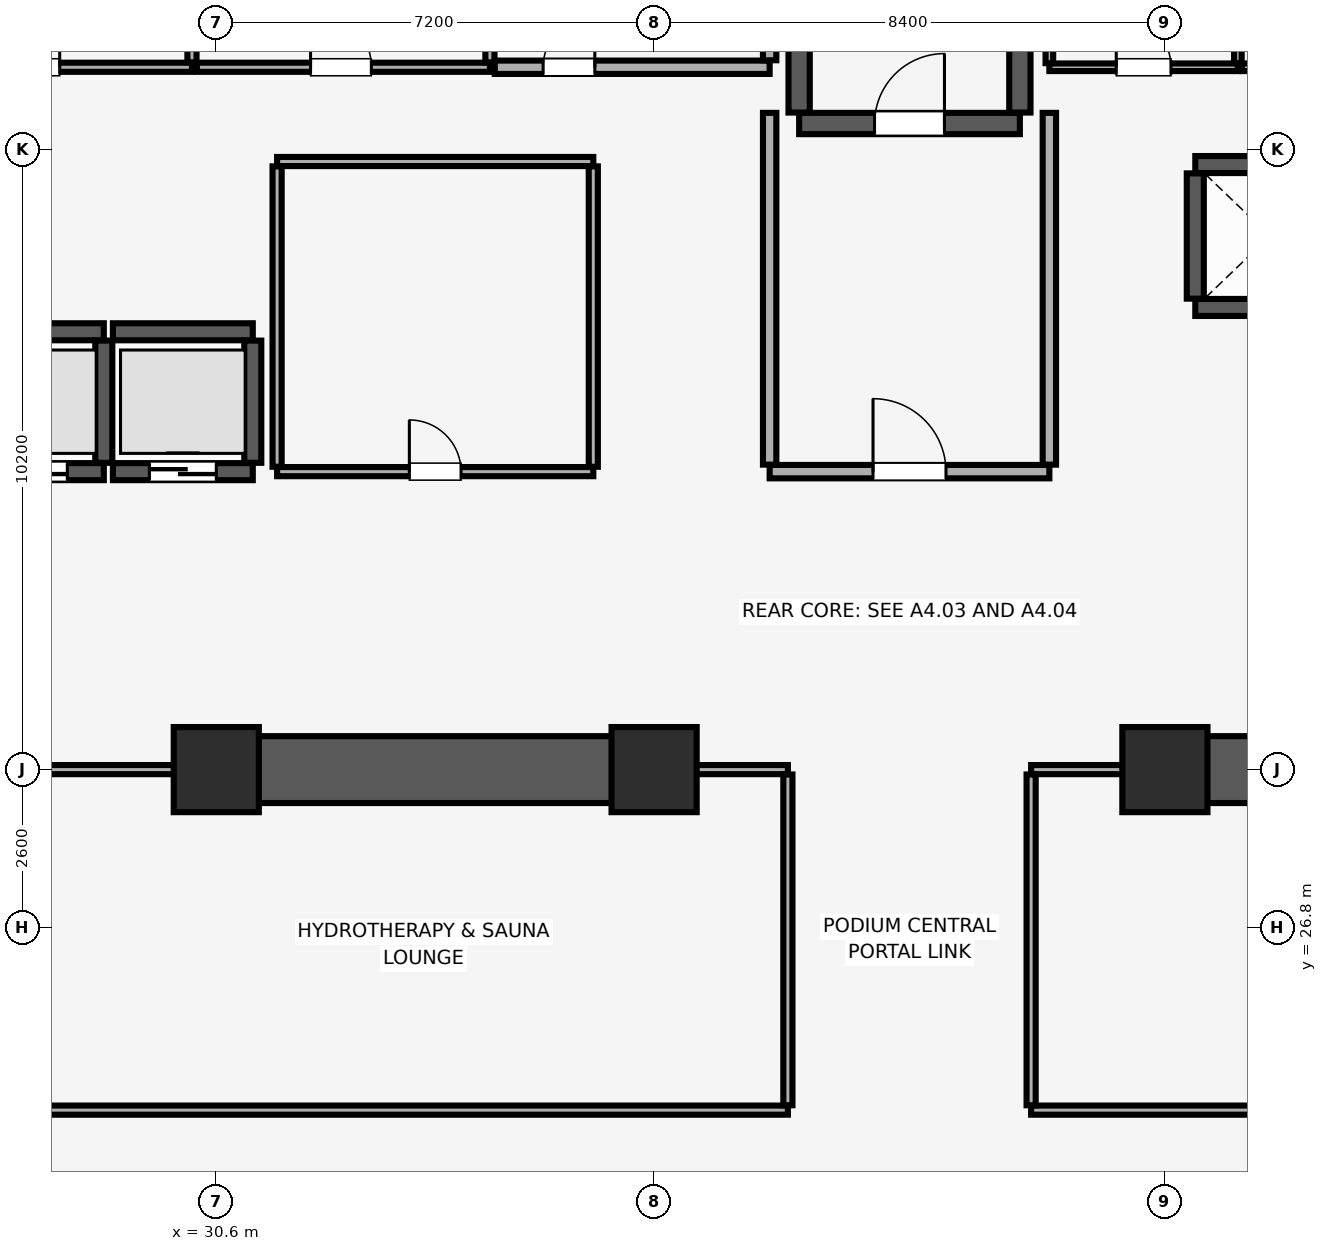
"""IFC4 building model, lengths in metres.
Left out: names, types, materials, properties, quantities, classifications, styles, units other than length and angle.
Written with IfcOpenShell. Run it as: python <this file> out.ifc"""

import sys

from ifc_helpers import new_model, si_unit, direction, frame, frame_2d, origin, origin_2d, place, context, subcontext, project, spatial, rectangle, extrude, element, fill, save


model = new_model("IFC4")
c1 = context("Model", 3, precision=1e-05, world=origin(), true_north=direction((0.0, 1.0)))
c2 = subcontext(c1, "Body", "Model", "MODEL_VIEW")
j1 = project(units=[si_unit("LENGTHUNIT", "METRE"), si_unit("PLANEANGLEUNIT", "RADIAN")], contexts=[c1])
p1 = place(None, origin())
s1 = spatial("IfcSite", under=j1, at=p1, CompositionType="ELEMENT")
p2 = place(p1, origin())
s2 = spatial("IfcBuilding", under=s1, at=p2, CompositionType="ELEMENT")
p3 = place(p2, frame((0.0, 0.0, 26.0)))
s3 = spatial("IfcBuildingStorey", under=s2, at=p3, CompositionType="ELEMENT", Elevation=26.0)
for number, where, z_axis, x_axis in (
    (1, (30.6, 29.4, 0.0), (0.0, 0.0, 1.0), (1.0, 0.0, 0.0)),
    (2, (37.8, 29.4, 0.0), (0.0, 0.0, 1.0), (1.0, 0.0, 0.0)),
    (3, (46.2, 29.4, 0.0), (0.0, 0.0, 1.0), (1.0, 0.0, 0.0)),
):
    element("IfcColumn", number, at=place(p3, frame(where, z_axis=z_axis, x_axis=x_axis)), inside=s3, PredefinedType="COLUMN", context=c2, shape_type="SweptSolid", body=[
        extrude(rectangle(XDim=1.4, YDim=1.4, at=origin_2d()), origin(), (0.0, 0.0, 1.0), 5.16),
    ])
for number, where, z_axis, x_axis in (
    (4, (30.4, 29.4, 0.0), (0.0, 0.0, 1.0), (1.0, 0.0, 0.0)),
    (5, (46.0, 29.4, 0.0), (0.0, 0.0, 1.0), (1.0, 0.0, 0.0)),
):
    element("IfcWall", number, at=place(p3, frame(where, z_axis=z_axis, x_axis=x_axis)), inside=s3, PredefinedType="SHEAR", context=c2, shape_type="SweptSolid", body=[
        extrude(rectangle(XDim=7.6, YDim=1.1, at=frame_2d((3.8, 0.0))), origin(), (0.0, 0.0, 1.0), 5.12),
    ])
p4 = place(p3, frame((40.185, 40.025, 0.0), z_axis=(0.0, 0.0, 1.0), x_axis=(1.0, 0.0, 0.0)))
e6 = element("IfcWall", 6, at=p4, inside=s3, PredefinedType="SHEAR", context=c2, shape_type="SweptSolid", body=[
    extrude(rectangle(XDim=3.63, YDim=0.35, at=frame_2d((1.815, 0.0))), origin(), (0.0, 0.0, 1.0), 5.12),
])
p5 = place(p4, frame((1.24, 0.0, 0.0)))
e7 = element("IfcOpeningElement", 7, at=p5, cuts=e6, PredefinedType="OPENING", context=c2, shape_type="SweptSolid", body=[
    extrude(rectangle(XDim=1.15, YDim=2.15, at=frame_2d((0.575, 1.075))), frame((0.0, 0.185, 0.0), z_axis=(0.0, -1.0, 0.0), x_axis=(1.0, 0.0, 0.0)), (0.0, 0.0, 1.0), 0.37),
])
for number, where, z_axis, x_axis in (
    (8, (40.185, 40.205, 0.0), (0.0, 0.0, 1.0), (0.0, 1.0, 0.0)),
    (9, (43.815, 40.205, 0.0), (0.0, 0.0, 1.0), (0.0, 1.0, 0.0)),
):
    element("IfcWall", number, at=place(p3, frame(where, z_axis=z_axis, x_axis=x_axis)), inside=s3, PredefinedType="SHEAR", context=c2, shape_type="SweptSolid", body=[
        extrude(rectangle(XDim=8.09, YDim=0.35, at=frame_2d((4.045, 0.0))), origin(), (0.0, 0.0, 1.0), 5.12),
    ])
p6 = place(p3, frame((26.45, 34.3, 0.0), z_axis=(0.0, 0.0, 1.0), x_axis=(1.0, 0.0, 0.0)))
e10 = element("IfcWall", 10, at=p6, inside=s3, PredefinedType="SHEAR", context=c2, shape_type="SweptSolid", body=[
    extrude(rectangle(XDim=2.3, YDim=0.28, at=frame_2d((1.15, 0.0))), origin(), (0.0, 0.0, 1.0), 5.12),
])
p7 = place(p6, frame((0.6, 0.0, 0.0)))
e11 = element("IfcOpeningElement", 11, at=p7, cuts=e10, PredefinedType="OPENING", context=c2, shape_type="SweptSolid", body=[
    extrude(rectangle(XDim=1.1, YDim=2.2, at=frame_2d((0.55, 1.1))), frame((0.0, 0.15, 0.0), z_axis=(0.0, -1.0, 0.0), x_axis=(1.0, 0.0, 0.0)), (0.0, 0.0, 1.0), 0.3),
])
p8 = place(p3, frame((26.45, 36.6, 0.0), z_axis=(0.0, 0.0, 1.0), x_axis=(1.0, 0.0, 0.0)))
e12 = element("IfcWall", 12, at=p8, inside=s3, PredefinedType="SHEAR", context=c2, shape_type="SweptSolid", body=[
    extrude(rectangle(XDim=2.3, YDim=0.28, at=frame_2d((1.15, 0.0))), origin(), (0.0, 0.0, 1.0), 5.12),
])
p9 = place(p3, frame((28.75, 34.445, 0.0), z_axis=(0.0, 0.0, 1.0), x_axis=(0.0, 1.0, 0.0)))
e13 = element("IfcWall", 13, at=p9, inside=s3, PredefinedType="SHEAR", context=c2, shape_type="SweptSolid", body=[
    extrude(rectangle(XDim=2.01, YDim=0.28, at=frame_2d((1.005, 0.0))), origin(), (0.0, 0.0, 1.0), 5.12),
])
p10 = place(p3, frame((28.9, 34.3, 0.0), z_axis=(0.0, 0.0, 1.0), x_axis=(1.0, 0.0, 0.0)))
e14 = element("IfcWall", 14, at=p10, inside=s3, PredefinedType="SHEAR", context=c2, shape_type="SweptSolid", body=[
    extrude(rectangle(XDim=2.3, YDim=0.28, at=frame_2d((1.15, 0.0))), origin(), (0.0, 0.0, 1.0), 5.12),
])
p11 = place(p10, frame((0.6, 0.0, 0.0)))
e15 = element("IfcOpeningElement", 15, at=p11, cuts=e14, PredefinedType="OPENING", context=c2, shape_type="SweptSolid", body=[
    extrude(rectangle(XDim=1.1, YDim=2.2, at=frame_2d((0.55, 1.1))), frame((0.0, 0.15, 0.0), z_axis=(0.0, -1.0, 0.0), x_axis=(1.0, 0.0, 0.0)), (0.0, 0.0, 1.0), 0.3),
])
p12 = place(p3, frame((28.9, 36.6, 0.0), z_axis=(0.0, 0.0, 1.0), x_axis=(1.0, 0.0, 0.0)))
e16 = element("IfcWall", 16, at=p12, inside=s3, PredefinedType="SHEAR", context=c2, shape_type="SweptSolid", body=[
    extrude(rectangle(XDim=2.3, YDim=0.28, at=frame_2d((1.15, 0.0))), origin(), (0.0, 0.0, 1.0), 5.12),
])
p13 = place(p3, frame((31.2, 34.445, 0.0), z_axis=(0.0, 0.0, 1.0), x_axis=(0.0, 1.0, 0.0)))
e17 = element("IfcWall", 17, at=p13, inside=s3, PredefinedType="SHEAR", context=c2, shape_type="SweptSolid", body=[
    extrude(rectangle(XDim=2.01, YDim=0.28, at=frame_2d((1.005, 0.0))), origin(), (0.0, 0.0, 1.0), 5.12),
])
for number, where, z_axis, x_axis in (
    (18, (46.7, 37.0, 0.0), (0.0, 0.0, 1.0), (1.0, 0.0, 0.0)),
    (19, (46.7, 39.35, 0.0), (0.0, 0.0, 1.0), (1.0, 0.0, 0.0)),
):
    element("IfcWall", number, at=place(p3, frame(where, z_axis=z_axis, x_axis=x_axis)), inside=s3, PredefinedType="SHEAR", context=c2, shape_type="SweptSolid", body=[
        extrude(rectangle(XDim=2.45, YDim=0.28, at=frame_2d((1.225, 0.0))), origin(), (0.0, 0.0, 1.0), 5.12),
    ])
p14 = place(p3, frame((46.7, 37.145, 0.0), z_axis=(0.0, 0.0, 1.0), x_axis=(0.0, 1.0, 0.0)))
e20 = element("IfcWall", 20, at=p14, inside=s3, PredefinedType="SHEAR", context=c2, shape_type="SweptSolid", body=[
    extrude(rectangle(XDim=2.06, YDim=0.28, at=frame_2d((1.03, 0.0))), origin(), (0.0, 0.0, 1.0), 5.12),
])
p15 = place(p3, frame((39.7, 34.3, 0.0), z_axis=(0.0, 0.0, 1.0), x_axis=(1.0, 0.0, 0.0)))
e21 = element("IfcWall", 21, at=p15, inside=s3, PredefinedType="PARTITIONING", context=c2, shape_type="SweptSolid", body=[
    extrude(rectangle(XDim=4.6, YDim=0.22, at=frame_2d((2.3, 0.0))), origin(), (0.0, 0.0, 1.0), 5.12),
])
p16 = place(p15, frame((1.7, 0.0, 0.0)))
e22 = element("IfcOpeningElement", 22, at=p16, cuts=e21, PredefinedType="OPENING", context=c2, shape_type="SweptSolid", body=[
    extrude(rectangle(XDim=1.2, YDim=2.15, at=frame_2d((0.6, 1.075))), frame((0.0, 0.12, 0.0), z_axis=(0.0, -1.0, 0.0), x_axis=(1.0, 0.0, 0.0)), (0.0, 0.0, 1.0), 0.24),
])
for number, where, z_axis, x_axis in (
    (23, (39.7, 34.415, 0.0), (0.0, 0.0, 1.0), (0.0, 1.0, 0.0)),
    (24, (44.3, 34.415, 0.0), (0.0, 0.0, 1.0), (0.0, 1.0, 0.0)),
):
    element("IfcWall", number, at=place(p3, frame(where, z_axis=z_axis, x_axis=x_axis)), inside=s3, PredefinedType="PARTITIONING", context=c2, shape_type="SweptSolid", body=[
        extrude(rectangle(XDim=5.785, YDim=0.22, at=frame_2d((2.893, 0.0))), origin(), (0.0, 0.0, 1.0), 5.12),
    ])
p17 = place(p3, frame((31.6, 34.3, 0.0), z_axis=(0.0, 0.0, 1.0), x_axis=(1.0, 0.0, 0.0)))
e25 = element("IfcWall", 25, at=p17, inside=s3, PredefinedType="PARTITIONING", context=c2, shape_type="SweptSolid", body=[
    extrude(rectangle(XDim=5.2, YDim=0.15, at=frame_2d((2.6, 0.0))), origin(), (0.0, 0.0, 1.0), 5.12),
])
p18 = place(p17, frame((2.175, 0.0, 0.0)))
e26 = element("IfcOpeningElement", 26, at=p18, cuts=e25, PredefinedType="OPENING", context=c2, shape_type="SweptSolid", body=[
    extrude(rectangle(XDim=0.85, YDim=2.1, at=frame_2d((0.425, 1.05))), frame((0.0, 0.085, 0.0), z_axis=(0.0, -1.0, 0.0), x_axis=(1.0, 0.0, 0.0)), (0.0, 0.0, 1.0), 0.17),
])
p19 = place(p3, frame((31.6, 39.4, 0.0), z_axis=(0.0, 0.0, 1.0), x_axis=(1.0, 0.0, 0.0)))
e27 = element("IfcWall", 27, at=p19, inside=s3, PredefinedType="PARTITIONING", context=c2, shape_type="SweptSolid", body=[
    extrude(rectangle(XDim=5.2, YDim=0.15, at=frame_2d((2.6, 0.0))), origin(), (0.0, 0.0, 1.0), 5.12),
])
for number, where, z_axis, x_axis in (
    (28, (31.6, 34.38, 0.0), (0.0, 0.0, 1.0), (0.0, 1.0, 0.0)),
    (29, (36.8, 34.38, 0.0), (0.0, 0.0, 1.0), (0.0, 1.0, 0.0)),
):
    element("IfcWall", number, at=place(p3, frame(where, z_axis=z_axis, x_axis=x_axis)), inside=s3, PredefinedType="PARTITIONING", context=c2, shape_type="SweptSolid", body=[
        extrude(rectangle(XDim=4.94, YDim=0.15, at=frame_2d((2.47, 0.0))), origin(), (0.0, 0.0, 1.0), 5.12),
    ])
p20 = place(p3, frame((25.0, 40.95, 0.0), z_axis=(0.0, 0.0, 1.0), x_axis=(1.0, 0.0, 0.0)))
e30 = element("IfcWall", 30, at=p20, inside=s3, PredefinedType="PARTITIONING", context=c2, shape_type="SweptSolid", body=[
    extrude(rectangle(XDim=5.2, YDim=0.15, at=frame_2d((2.6, 0.0))), origin(), (0.0, 0.0, 1.0), 5.12),
])
p21 = place(p20, frame((2.175, 0.0, 0.0)))
e31 = element("IfcOpeningElement", 31, at=p21, cuts=e30, PredefinedType="OPENING", context=c2, shape_type="SweptSolid", body=[
    extrude(rectangle(XDim=0.85, YDim=2.1, at=frame_2d((0.425, 1.05))), frame((0.0, 0.085, 0.0), z_axis=(0.0, -1.0, 0.0), x_axis=(1.0, 0.0, 0.0)), (0.0, 0.0, 1.0), 0.17),
])
p22 = place(p3, frame((30.2, 41.03, 0.0), z_axis=(0.0, 0.0, 1.0), x_axis=(0.0, 1.0, 0.0)))
e32 = element("IfcWall", 32, at=p22, inside=s3, PredefinedType="PARTITIONING", context=c2, shape_type="SweptSolid", body=[
    extrude(rectangle(XDim=7.19, YDim=0.15, at=frame_2d((3.595, 0.0))), origin(), (0.0, 0.0, 1.0), 5.12),
])
p23 = place(p3, frame((30.28, 40.95, 0.0), z_axis=(0.0, 0.0, 1.0), x_axis=(1.0, 0.0, 0.0)))
e33 = element("IfcWall", 33, at=p23, inside=s3, PredefinedType="PARTITIONING", context=c2, shape_type="SweptSolid", body=[
    extrude(rectangle(XDim=4.82, YDim=0.15, at=frame_2d((2.41, 0.0))), origin(), (0.0, 0.0, 1.0), 5.12),
])
p24 = place(p23, frame((1.87, 0.0, 0.0)))
e34 = element("IfcOpeningElement", 34, at=p24, cuts=e33, PredefinedType="OPENING", context=c2, shape_type="SweptSolid", body=[
    extrude(rectangle(XDim=1.0, YDim=2.15, at=frame_2d((0.5, 1.075))), frame((0.0, 0.085, 0.0), z_axis=(0.0, -1.0, 0.0), x_axis=(1.0, 0.0, 0.0)), (0.0, 0.0, 1.0), 0.17),
])
p25 = place(p3, frame((35.1, 41.03, 0.0), z_axis=(0.0, 0.0, 1.0), x_axis=(0.0, 1.0, 0.0)))
e35 = element("IfcWall", 35, at=p25, inside=s3, PredefinedType="PARTITIONING", context=c2, shape_type="SweptSolid", body=[
    extrude(rectangle(XDim=7.19, YDim=0.15, at=frame_2d((3.595, 0.0))), origin(), (0.0, 0.0, 1.0), 5.12),
])
p26 = place(p3, frame((35.18, 40.95, 0.0), z_axis=(0.0, 0.0, 1.0), x_axis=(1.0, 0.0, 0.0)))
e36 = element("IfcWall", 36, at=p26, inside=s3, PredefinedType="PARTITIONING", context=c2, shape_type="SweptSolid", body=[
    extrude(rectangle(XDim=4.52, YDim=0.22, at=frame_2d((2.26, 0.0))), origin(), (0.0, 0.0, 1.0), 5.12),
])
p27 = place(p26, frame((0.795, 0.0, 0.0)))
e37 = element("IfcOpeningElement", 37, at=p27, cuts=e36, PredefinedType="OPENING", context=c2, shape_type="SweptSolid", body=[
    extrude(rectangle(XDim=0.85, YDim=2.1, at=frame_2d((0.425, 1.05))), frame((0.0, 0.12, 0.0), z_axis=(0.0, -1.0, 0.0), x_axis=(1.0, 0.0, 0.0)), (0.0, 0.0, 1.0), 0.24),
])
p28 = place(p3, frame((39.7, 41.065, 0.0), z_axis=(0.0, 0.0, 1.0), x_axis=(0.0, 1.0, 0.0)))
e38 = element("IfcWall", 38, at=p28, inside=s3, PredefinedType="PARTITIONING", context=c2, shape_type="SweptSolid", body=[
    extrude(rectangle(XDim=7.12, YDim=0.22, at=frame_2d((3.56, 0.0))), origin(), (0.0, 0.0, 1.0), 5.12),
])
p29 = place(p3, frame((44.3, 40.95, 0.0), z_axis=(0.0, 0.0, 1.0), x_axis=(1.0, 0.0, 0.0)))
e39 = element("IfcWall", 39, at=p29, inside=s3, PredefinedType="PARTITIONING", context=c2, shape_type="SweptSolid", body=[
    extrude(rectangle(XDim=3.1, YDim=0.125, at=frame_2d((1.55, 0.0))), origin(), (0.0, 0.0, 1.0), 5.12),
])
p30 = place(p29, frame((1.1, 0.0, 0.0)))
e40 = element("IfcOpeningElement", 40, at=p30, cuts=e39, PredefinedType="OPENING", context=c2, shape_type="SweptSolid", body=[
    extrude(rectangle(XDim=0.9, YDim=2.1, at=frame_2d((0.45, 1.05))), frame((0.0, 0.073, 0.0), z_axis=(0.0, -1.0, 0.0), x_axis=(1.0, 0.0, 0.0)), (0.0, 0.0, 1.0), 0.145),
])
for number, where, z_axis, x_axis in (
    (41, (44.3, 41.018, 0.0), (0.0, 0.0, 1.0), (0.0, 1.0, 0.0)),
    (42, (47.4, 41.018, 0.0), (0.0, 0.0, 1.0), (0.0, 1.0, 0.0)),
):
    element("IfcWall", number, at=place(p3, frame(where, z_axis=z_axis, x_axis=x_axis)), inside=s3, PredefinedType="PARTITIONING", context=c2, shape_type="SweptSolid", body=[
        extrude(rectangle(XDim=7.215, YDim=0.125, at=frame_2d((3.607, 0.0))), origin(), (0.0, 0.0, 1.0), 5.12),
    ])
p31 = place(p3, frame((47.468, 40.95, 0.0), z_axis=(0.0, 0.0, 1.0), x_axis=(1.0, 0.0, 0.0)))
e43 = element("IfcWall", 43, at=p31, inside=s3, PredefinedType="PARTITIONING", context=c2, shape_type="SweptSolid", body=[
    extrude(rectangle(XDim=4.932, YDim=0.125, at=frame_2d((2.466, 0.0))), origin(), (0.0, 0.0, 1.0), 5.12),
])
p32 = place(p31, frame((1.982, 0.0, 0.0)))
e44 = element("IfcOpeningElement", 44, at=p32, cuts=e43, PredefinedType="OPENING", context=c2, shape_type="SweptSolid", body=[
    extrude(rectangle(XDim=0.9, YDim=2.1, at=frame_2d((0.45, 1.05))), frame((0.0, 0.073, 0.0), z_axis=(0.0, -1.0, 0.0), x_axis=(1.0, 0.0, 0.0)), (0.0, 0.0, 1.0), 0.145),
])
p33 = place(p3, frame((16.4, 23.8, 0.0), z_axis=(0.0, 0.0, 1.0), x_axis=(1.0, 0.0, 0.0)))
e45 = element("IfcWall", 45, at=p33, inside=s3, PredefinedType="PARTITIONING", context=c2, shape_type="SweptSolid", body=[
    extrude(rectangle(XDim=23.6, YDim=0.15, at=frame_2d((11.8, 0.0))), origin(), (0.0, 0.0, 1.0), 5.12),
])
p34 = place(p33, frame((10.1, 0.0, 0.0)))
e46 = element("IfcOpeningElement", 46, at=p34, cuts=e45, PredefinedType="OPENING", context=c2, shape_type="SweptSolid", body=[
    extrude(rectangle(XDim=1.0, YDim=2.15, at=frame_2d((0.5, 1.075))), frame((0.0, 0.085, 0.0), z_axis=(0.0, -1.0, 0.0), x_axis=(1.0, 0.0, 0.0)), (0.0, 0.0, 1.0), 0.17),
])
p35 = place(p3, frame((23.61, 29.4, 0.0), z_axis=(0.0, 0.0, 1.0), x_axis=(1.0, 0.0, 0.0)))
e47 = element("IfcWall", 47, at=p35, inside=s3, PredefinedType="PARTITIONING", context=c2, shape_type="SweptSolid", body=[
    extrude(rectangle(XDim=6.78, YDim=0.15, at=frame_2d((3.39, 0.0))), origin(), (0.0, 0.0, 1.0), 4.06),
])
p36 = place(p3, frame((38.01, 29.4, 0.0), z_axis=(0.0, 0.0, 1.0), x_axis=(1.0, 0.0, 0.0)))
e48 = element("IfcWall", 48, at=p36, inside=s3, PredefinedType="PARTITIONING", context=c2, shape_type="SweptSolid", body=[
    extrude(rectangle(XDim=1.99, YDim=0.15, at=frame_2d((0.995, 0.0))), origin(), (0.0, 0.0, 1.0), 4.06),
])
p37 = place(p3, frame((40.0, 23.88, 0.0), z_axis=(0.0, 0.0, 1.0), x_axis=(0.0, 1.0, 0.0)))
e49 = element("IfcWall", 49, at=p37, inside=s3, PredefinedType="PARTITIONING", context=c2, shape_type="SweptSolid", body=[
    extrude(rectangle(XDim=5.44, YDim=0.15, at=frame_2d((2.72, 0.0))), origin(), (0.0, 0.0, 1.0), 5.12),
])
p38 = place(p3, frame((44.0, 23.8, 0.0), z_axis=(0.0, 0.0, 1.0), x_axis=(1.0, 0.0, 0.0)))
e50 = element("IfcWall", 50, at=p38, inside=s3, PredefinedType="PARTITIONING", context=c2, shape_type="SweptSolid", body=[
    extrude(rectangle(XDim=23.6, YDim=0.15, at=frame_2d((11.8, 0.0))), origin(), (0.0, 0.0, 1.0), 5.12),
])
p39 = place(p38, frame((11.5, 0.0, 0.0)))
e51 = element("IfcOpeningElement", 51, at=p39, cuts=e50, PredefinedType="OPENING", context=c2, shape_type="SweptSolid", body=[
    extrude(rectangle(XDim=1.0, YDim=2.15, at=frame_2d((0.5, 1.075))), frame((0.0, 0.085, 0.0), z_axis=(0.0, -1.0, 0.0), x_axis=(1.0, 0.0, 0.0)), (0.0, 0.0, 1.0), 0.17),
])
p40 = place(p3, frame((44.0, 29.4, 0.0), z_axis=(0.0, 0.0, 1.0), x_axis=(1.0, 0.0, 0.0)))
e52 = element("IfcWall", 52, at=p40, inside=s3, PredefinedType="PARTITIONING", context=c2, shape_type="SweptSolid", body=[
    extrude(rectangle(XDim=1.99, YDim=0.15, at=frame_2d((0.995, 0.0))), origin(), (0.0, 0.0, 1.0), 4.06),
])
p41 = place(p3, frame((44.0, 23.88, 0.0), z_axis=(0.0, 0.0, 1.0), x_axis=(0.0, 1.0, 0.0)))
e53 = element("IfcWall", 53, at=p41, inside=s3, PredefinedType="PARTITIONING", context=c2, shape_type="SweptSolid", body=[
    extrude(rectangle(XDim=5.44, YDim=0.15, at=frame_2d((2.72, 0.0))), origin(), (0.0, 0.0, 1.0), 5.12),
])
p42 = place(p5, origin())
e54 = element("IfcDoor", 54, at=p42, inside=s3, OperationType="SINGLE_SWING_RIGHT", PredefinedType="DOOR", context=c2, shape_type="SweptSolid", body=[
    extrude(rectangle(XDim=1.15, YDim=2.15, at=frame_2d((0.575, 1.075))), frame((0.0, 0.025, 0.0), z_axis=(0.0, -1.0, 0.0), x_axis=(1.0, 0.0, 0.0)), (0.0, 0.0, 1.0), 0.05),
])
fill(e7, e54)
p43 = place(p7, origin())
e55 = element("IfcDoor", 55, at=p43, inside=s3, OperationType="DOUBLE_DOOR_SLIDING", PredefinedType="DOOR", context=c2, shape_type="SweptSolid", body=[
    extrude(rectangle(XDim=1.1, YDim=2.2, at=frame_2d((0.55, 1.1))), frame((0.0, 0.025, 0.0), z_axis=(0.0, -1.0, 0.0), x_axis=(1.0, 0.0, 0.0)), (0.0, 0.0, 1.0), 0.05),
])
fill(e11, e55)
p44 = place(p11, origin())
e56 = element("IfcDoor", 56, at=p44, inside=s3, OperationType="DOUBLE_DOOR_SLIDING", PredefinedType="DOOR", context=c2, shape_type="SweptSolid", body=[
    extrude(rectangle(XDim=1.1, YDim=2.2, at=frame_2d((0.55, 1.1))), frame((0.0, 0.025, 0.0), z_axis=(0.0, -1.0, 0.0), x_axis=(1.0, 0.0, 0.0)), (0.0, 0.0, 1.0), 0.05),
])
fill(e15, e56)
p45 = place(p16, origin())
e57 = element("IfcDoor", 57, at=p45, inside=s3, OperationType="SINGLE_SWING_LEFT", PredefinedType="DOOR", context=c2, shape_type="SweptSolid", body=[
    extrude(rectangle(XDim=1.2, YDim=2.15, at=frame_2d((0.6, 1.075))), frame((0.0, 0.025, 0.0), z_axis=(0.0, -1.0, 0.0), x_axis=(1.0, 0.0, 0.0)), (0.0, 0.0, 1.0), 0.05),
])
fill(e22, e57)
p46 = place(p18, origin())
e58 = element("IfcDoor", 58, at=p46, inside=s3, OperationType="SINGLE_SWING_LEFT", PredefinedType="DOOR", context=c2, shape_type="SweptSolid", body=[
    extrude(rectangle(XDim=0.85, YDim=2.1, at=frame_2d((0.425, 1.05))), frame((0.0, 0.025, 0.0), z_axis=(0.0, -1.0, 0.0), x_axis=(1.0, 0.0, 0.0)), (0.0, 0.0, 1.0), 0.05),
])
fill(e26, e58)
p47 = place(p21, origin())
e59 = element("IfcDoor", 59, at=p47, inside=s3, OperationType="SINGLE_SWING_RIGHT", PredefinedType="DOOR", context=c2, shape_type="SweptSolid", body=[
    extrude(rectangle(XDim=0.85, YDim=2.1, at=frame_2d((0.425, 1.05))), frame((0.0, 0.025, 0.0), z_axis=(0.0, -1.0, 0.0), x_axis=(1.0, 0.0, 0.0)), (0.0, 0.0, 1.0), 0.05),
])
fill(e31, e59)
p48 = place(p24, origin())
e60 = element("IfcDoor", 60, at=p48, inside=s3, OperationType="SINGLE_SWING_LEFT", PredefinedType="DOOR", context=c2, shape_type="SweptSolid", body=[
    extrude(rectangle(XDim=1.0, YDim=2.15, at=frame_2d((0.5, 1.075))), frame((0.0, 0.025, 0.0), z_axis=(0.0, -1.0, 0.0), x_axis=(1.0, 0.0, 0.0)), (0.0, 0.0, 1.0), 0.05),
])
fill(e34, e60)
p49 = place(p27, origin())
e61 = element("IfcDoor", 61, at=p49, inside=s3, OperationType="SINGLE_SWING_RIGHT", PredefinedType="DOOR", context=c2, shape_type="SweptSolid", body=[
    extrude(rectangle(XDim=0.85, YDim=2.1, at=frame_2d((0.425, 1.05))), frame((0.0, 0.025, 0.0), z_axis=(0.0, -1.0, 0.0), x_axis=(1.0, 0.0, 0.0)), (0.0, 0.0, 1.0), 0.05),
])
fill(e37, e61)
p50 = place(p30, origin())
e62 = element("IfcDoor", 62, at=p50, inside=s3, OperationType="SINGLE_SWING_LEFT", PredefinedType="DOOR", context=c2, shape_type="SweptSolid", body=[
    extrude(rectangle(XDim=0.9, YDim=2.1, at=frame_2d((0.45, 1.05))), frame((0.0, 0.025, 0.0), z_axis=(0.0, -1.0, 0.0), x_axis=(1.0, 0.0, 0.0)), (0.0, 0.0, 1.0), 0.05),
])
fill(e40, e62)
save(model, sys.argv[1])
